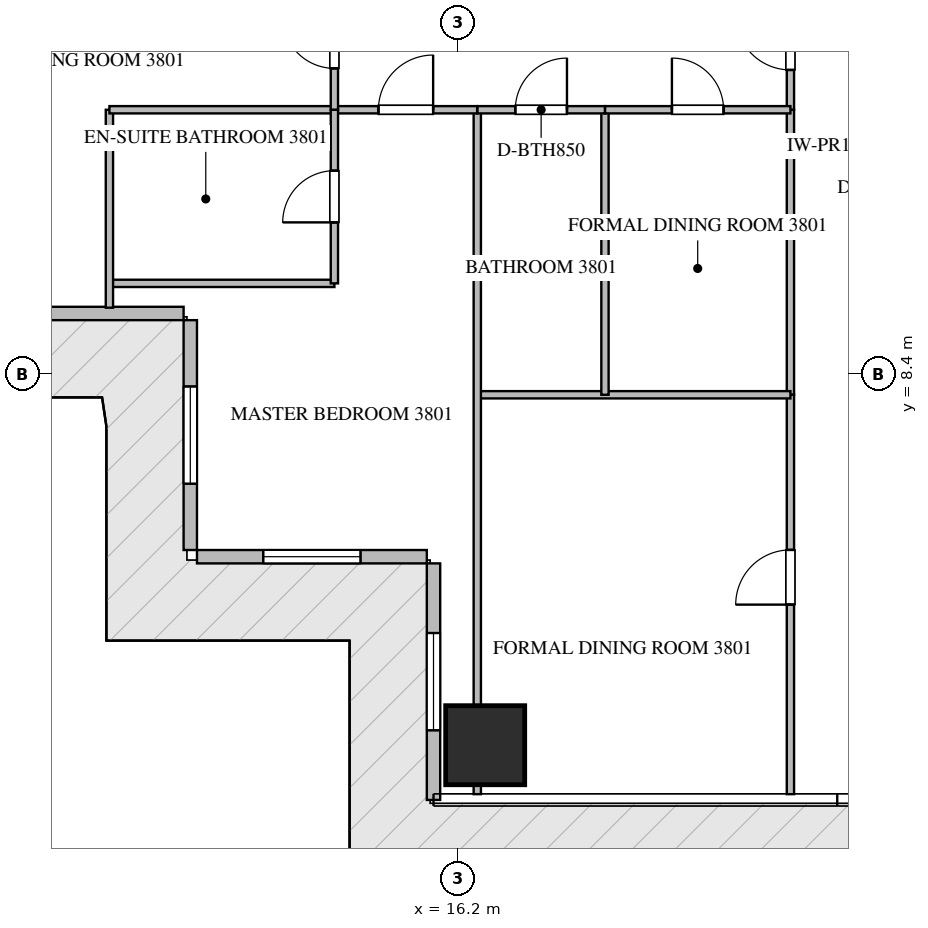
"""IFC4 building model, lengths in metres.
Left out: names, types, materials, properties, quantities, classifications, styles, units other than length and angle.
Written with IfcOpenShell. Run it as: python <this file> out.ifc"""

import sys

from ifc_helpers import new_model, si_unit, direction, frame, frame_2d, origin, origin_2d, place, context, subcontext, project, spatial, rectangle, extrude, source, transform, mapped, element, fill, save


model = new_model("IFC4")
c1 = context("Model", 3, precision=1e-05, world=origin(), true_north=direction((0.0, 1.0)))
c2 = subcontext(c1, "Body", "Model", "MODEL_VIEW")
j1 = project(units=[si_unit("LENGTHUNIT", "METRE"), si_unit("PLANEANGLEUNIT", "RADIAN")], contexts=[c1])
p1 = place(None, origin())
s1 = spatial("IfcSite", under=j1, at=p1, CompositionType="ELEMENT")
p2 = place(p1, origin())
s2 = spatial("IfcBuilding", under=s1, at=p2, CompositionType="ELEMENT")
p3 = place(p2, frame((0.0, 0.0, 153.9)))
s3 = spatial("IfcBuildingStorey", under=s2, at=p3, CompositionType="ELEMENT", Elevation=153.9)
m1 = source(origin(), c2, "Body", "SweptSolid", [
    extrude(rectangle(XDim=1.3, YDim=1.3, at=origin_2d()), origin(), (0.0, 0.0, 1.0), 3.75),
])
p4 = place(p3, frame((16.65, 2.3, -0.26), z_axis=(0.0, 0.0, 1.0), x_axis=(1.0, 0.0, 0.0)))
e1 = element("IfcColumn", 1, at=p4, inside=s3, PredefinedType="COLUMN", context=c2, shape_type="MappedRepresentation", body=[
    mapped(m1, transform((0.0, 0.0, 0.0), scale=1.0)),
])
p5 = place(p3, frame((7.8, 9.4, 0.0), z_axis=(0.0, 0.0, 1.0), x_axis=(1.0, 0.0, 0.0)))
e2 = element("IfcWall", 2, at=p5, inside=s3, PredefinedType="ELEMENTEDWALL", context=c2, shape_type="SweptSolid", body=[
    extrude(rectangle(XDim=3.89, YDim=0.22, at=frame_2d((1.945, 0.0))), origin(), (0.0, 0.0, 1.0), 3.475),
])
p6 = place(p3, frame((11.8, 9.29, 0.0), z_axis=(0.0, 0.0, 1.0), x_axis=(0.0, -1.0, 0.0)))
e3 = element("IfcWall", 3, at=p6, inside=s3, PredefinedType="ELEMENTEDWALL", context=c2, shape_type="SweptSolid", body=[
    extrude(rectangle(XDim=3.78, YDim=0.22, at=frame_2d((1.89, 0.0))), origin(), (0.0, 0.0, 1.0), 3.475),
])
p7 = place(p6, frame((1.09, 0.0, 0.65)))
e4 = element("IfcOpeningElement", 4, at=p7, cuts=e3, PredefinedType="OPENING", context=c2, shape_type="SweptSolid", body=[
    extrude(rectangle(XDim=1.6, YDim=2.1, at=frame_2d((0.8, 1.05))), frame((0.0, 0.12, 0.0), z_axis=(0.0, -1.0, 0.0), x_axis=(1.0, 0.0, 0.0)), (0.0, 0.0, 1.0), 0.24),
])
p8 = place(p3, frame((11.91, 5.4, 0.0), z_axis=(0.0, 0.0, 1.0), x_axis=(1.0, 0.0, 0.0)))
e5 = element("IfcWall", 5, at=p8, inside=s3, PredefinedType="ELEMENTEDWALL", context=c2, shape_type="SweptSolid", body=[
    extrude(rectangle(XDim=3.78, YDim=0.22, at=frame_2d((1.89, 0.0))), origin(), (0.0, 0.0, 1.0), 3.475),
])
p9 = place(p8, frame((1.09, 0.0, 0.65)))
e6 = element("IfcOpeningElement", 6, at=p9, cuts=e5, PredefinedType="OPENING", context=c2, shape_type="SweptSolid", body=[
    extrude(rectangle(XDim=1.6, YDim=2.1, at=frame_2d((0.8, 1.05))), frame((0.0, 0.12, 0.0), z_axis=(0.0, -1.0, 0.0), x_axis=(1.0, 0.0, 0.0)), (0.0, 0.0, 1.0), 0.24),
])
p10 = place(p3, frame((15.8, 5.29, 0.0), z_axis=(0.0, 0.0, 1.0), x_axis=(0.0, -1.0, 0.0)))
e7 = element("IfcWall", 7, at=p10, inside=s3, PredefinedType="ELEMENTEDWALL", context=c2, shape_type="SweptSolid", body=[
    extrude(rectangle(XDim=3.89, YDim=0.22, at=frame_2d((1.945, 0.0))), origin(), (0.0, 0.0, 1.0), 3.475),
])
p11 = place(p10, frame((1.145, 0.0, 0.65)))
e8 = element("IfcOpeningElement", 8, at=p11, cuts=e7, PredefinedType="OPENING", context=c2, shape_type="SweptSolid", body=[
    extrude(rectangle(XDim=1.6, YDim=2.1, at=frame_2d((0.8, 1.05))), frame((0.0, 0.12, 0.0), z_axis=(0.0, -1.0, 0.0), x_axis=(1.0, 0.0, 0.0)), (0.0, 0.0, 1.0), 0.24),
])
p12 = place(p3, frame((21.67, 12.15, 0.0), z_axis=(0.0, 0.0, 1.0), x_axis=(1.0, 0.0, 0.0)))
e9 = element("IfcWall", 9, at=p12, inside=s3, PredefinedType="PARTITIONING", context=c2, shape_type="SweptSolid", body=[
    extrude(rectangle(XDim=2.85, YDim=0.12, at=frame_2d((1.425, 0.0))), origin(), (0.0, 0.0, 1.0), 3.49),
])
p13 = place(p12, frame((1.0, 0.0, 0.0)))
e10 = element("IfcOpeningElement", 10, at=p13, cuts=e9, PredefinedType="OPENING", context=c2, shape_type="SweptSolid", body=[
    extrude(rectangle(XDim=0.85, YDim=2.1, at=frame_2d((0.425, 1.05))), frame((0.0, 0.07, 0.0), z_axis=(0.0, -1.0, 0.0), x_axis=(1.0, 0.0, 0.0)), (0.0, 0.0, 1.0), 0.14),
])
p14 = place(p3, frame((21.67, 12.75, 0.0), z_axis=(0.0, 0.0, 1.0), x_axis=(0.0, 1.0, 0.0)))
e11 = element("IfcWall", 11, at=p14, inside=s3, PredefinedType="PARTITIONING", context=c2, shape_type="SweptSolid", body=[
    extrude(rectangle(XDim=2.21, YDim=0.12, at=frame_2d((1.105, 0.0))), origin(), (0.0, 0.0, 1.0), 3.49),
])
p15 = place(p14, frame((0.655, 0.0, 0.0)))
e12 = element("IfcOpeningElement", 12, at=p15, cuts=e11, PredefinedType="OPENING", context=c2, shape_type="SweptSolid", body=[
    extrude(rectangle(XDim=0.9, YDim=2.1, at=frame_2d((0.45, 1.05))), frame((0.0, 0.07, 0.0), z_axis=(0.0, -1.0, 0.0), x_axis=(1.0, 0.0, 0.0)), (0.0, 0.0, 1.0), 0.14),
])
p16 = place(p3, frame((21.67, 1.495, 0.0), z_axis=(0.0, 0.0, 1.0), x_axis=(0.0, 1.0, 0.0)))
e13 = element("IfcWall", 13, at=p16, inside=s3, PredefinedType="PARTITIONING", context=c2, shape_type="SweptSolid", body=[
    extrude(rectangle(XDim=6.568, YDim=0.12, at=frame_2d((3.284, 0.0))), origin(), (0.0, 0.0, 1.0), 3.49),
])
p17 = place(p16, frame((3.117, 0.0, 0.0)))
e14 = element("IfcOpeningElement", 14, at=p17, cuts=e13, PredefinedType="OPENING", context=c2, shape_type="SweptSolid", body=[
    extrude(rectangle(XDim=0.9, YDim=2.1, at=frame_2d((0.45, 1.05))), frame((0.0, 0.07, 0.0), z_axis=(0.0, -1.0, 0.0), x_axis=(1.0, 0.0, 0.0)), (0.0, 0.0, 1.0), 0.14),
])
p18 = place(p3, frame((21.67, 8.065, 0.0), z_axis=(0.0, 0.0, 1.0), x_axis=(0.0, 1.0, 0.0)))
e15 = element("IfcWall", 15, at=p18, inside=s3, PredefinedType="PARTITIONING", context=c2, shape_type="SweptSolid", body=[
    extrude(rectangle(XDim=4.683, YDim=0.12, at=frame_2d((2.342, 0.0))), origin(), (0.0, 0.0, 1.0), 3.49),
])
p19 = place(p3, frame((16.52, 8.063, 0.0), z_axis=(0.0, 0.0, 1.0), x_axis=(1.0, 0.0, 0.0)))
e16 = element("IfcWall", 16, at=p19, inside=s3, PredefinedType="PARTITIONING", context=c2, shape_type="SweptSolid", body=[
    extrude(rectangle(XDim=5.15, YDim=0.12, at=frame_2d((2.575, 0.0))), origin(), (0.0, 0.0, 1.0), 3.49),
])
p20 = place(p3, frame((16.52, 1.495, 0.0), z_axis=(0.0, 0.0, 1.0), x_axis=(0.0, 1.0, 0.0)))
e17 = element("IfcWall", 17, at=p20, inside=s3, PredefinedType="PARTITIONING", context=c2, shape_type="SweptSolid", body=[
    extrude(rectangle(XDim=11.255, YDim=0.12, at=frame_2d((5.627, 0.0))), origin(), (0.0, 0.0, 1.0), 2.972),
])
p21 = place(p3, frame((18.62, 8.063, 0.0), z_axis=(0.0, 0.0, 1.0), x_axis=(0.0, 1.0, 0.0)))
e18 = element("IfcWall", 18, at=p21, inside=s3, PredefinedType="PARTITIONING", context=c2, shape_type="SweptSolid", body=[
    extrude(rectangle(XDim=4.687, YDim=0.12, at=frame_2d((2.344, 0.0))), origin(), (0.0, 0.0, 1.0), 3.49),
])
p22 = place(p3, frame((16.52, 12.75, 0.0), z_axis=(0.0, 0.0, 1.0), x_axis=(1.0, 0.0, 0.0)))
e19 = element("IfcWall", 19, at=p22, inside=s3, PredefinedType="PARTITIONING", context=c2, shape_type="SweptSolid", body=[
    extrude(rectangle(XDim=2.1, YDim=0.12, at=frame_2d((1.05, 0.0))), origin(), (0.0, 0.0, 1.0), 3.49),
])
p23 = place(p22, frame((0.625, 0.0, 0.0)))
e20 = element("IfcOpeningElement", 20, at=p23, cuts=e19, PredefinedType="OPENING", context=c2, shape_type="SweptSolid", body=[
    extrude(rectangle(XDim=0.85, YDim=2.1, at=frame_2d((0.425, 1.05))), frame((0.0, 0.07, 0.0), z_axis=(0.0, -1.0, 0.0), x_axis=(1.0, 0.0, 0.0)), (0.0, 0.0, 1.0), 0.14),
])
p24 = place(p3, frame((18.622, 12.75, 0.0), z_axis=(0.0, 0.0, 1.0), x_axis=(1.0, 0.0, 0.0)))
e21 = element("IfcWall", 21, at=p24, inside=s3, PredefinedType="PARTITIONING", context=c2, shape_type="SweptSolid", body=[
    extrude(rectangle(XDim=3.048, YDim=0.12, at=frame_2d((1.524, 0.0))), origin(), (0.0, 0.0, 1.0), 3.49),
])
p25 = place(p24, frame((1.099, 0.0, 0.0)))
e22 = element("IfcOpeningElement", 22, at=p25, cuts=e21, PredefinedType="OPENING", context=c2, shape_type="SweptSolid", body=[
    extrude(rectangle(XDim=0.85, YDim=2.1, at=frame_2d((0.425, 1.05))), frame((0.0, 0.07, 0.0), z_axis=(0.0, -1.0, 0.0), x_axis=(1.0, 0.0, 0.0)), (0.0, 0.0, 1.0), 0.14),
])
p26 = place(p3, frame((14.17, 12.75, 0.0), z_axis=(0.0, 0.0, 1.0), x_axis=(1.0, 0.0, 0.0)))
e23 = element("IfcWall", 23, at=p26, inside=s3, PredefinedType="PARTITIONING", context=c2, shape_type="SweptSolid", body=[
    extrude(rectangle(XDim=2.348, YDim=0.12, at=frame_2d((1.174, 0.0))), origin(), (0.0, 0.0, 1.0), 3.49),
])
p27 = place(p26, frame((0.724, 0.0, 0.0)))
e24 = element("IfcOpeningElement", 24, at=p27, cuts=e23, PredefinedType="OPENING", context=c2, shape_type="SweptSolid", body=[
    extrude(rectangle(XDim=0.9, YDim=2.1, at=frame_2d((0.45, 1.05))), frame((0.0, 0.07, 0.0), z_axis=(0.0, -1.0, 0.0), x_axis=(1.0, 0.0, 0.0)), (0.0, 0.0, 1.0), 0.14),
])
p28 = place(p3, frame((10.47, 9.895, 0.0), z_axis=(0.0, 0.0, 1.0), x_axis=(1.0, 0.0, 0.0)))
e25 = element("IfcWall", 25, at=p28, inside=s3, PredefinedType="PARTITIONING", context=c2, shape_type="SweptSolid", body=[
    extrude(rectangle(XDim=3.7, YDim=0.12, at=frame_2d((1.85, 0.0))), origin(), (0.0, 0.0, 1.0), 3.49),
])
p29 = place(p3, frame((10.47, 9.495, 0.0), z_axis=(0.0, 0.0, 1.0), x_axis=(0.0, 1.0, 0.0)))
e26 = element("IfcWall", 26, at=p29, inside=s3, PredefinedType="PARTITIONING", context=c2, shape_type="SweptSolid", body=[
    extrude(rectangle(XDim=3.255, YDim=0.12, at=frame_2d((1.627, 0.0))), origin(), (0.0, 0.0, 1.0), 3.49),
])
p30 = place(p3, frame((10.47, 12.75, 0.0), z_axis=(0.0, 0.0, 1.0), x_axis=(1.0, 0.0, 0.0)))
e27 = element("IfcWall", 27, at=p30, inside=s3, PredefinedType="PARTITIONING", context=c2, shape_type="SweptSolid", body=[
    extrude(rectangle(XDim=3.698, YDim=0.12, at=frame_2d((1.849, 0.0))), origin(), (0.0, 0.0, 1.0), 3.49),
])
p31 = place(p3, frame((14.17, 9.895, 0.0), z_axis=(0.0, 0.0, 1.0), x_axis=(0.0, 1.0, 0.0)))
e28 = element("IfcWall", 28, at=p31, inside=s3, PredefinedType="PARTITIONING", context=c2, shape_type="SweptSolid", body=[
    extrude(rectangle(XDim=2.855, YDim=0.12, at=frame_2d((1.427, 0.0))), origin(), (0.0, 0.0, 1.0), 3.49),
])
p32 = place(p31, frame((1.003, 0.0, 0.0)))
e29 = element("IfcOpeningElement", 29, at=p32, cuts=e28, PredefinedType="OPENING", context=c2, shape_type="SweptSolid", body=[
    extrude(rectangle(XDim=0.85, YDim=2.1, at=frame_2d((0.425, 1.05))), frame((0.0, 0.07, 0.0), z_axis=(0.0, -1.0, 0.0), x_axis=(1.0, 0.0, 0.0)), (0.0, 0.0, 1.0), 0.14),
])
p33 = place(p3, frame((14.17, 12.752, 0.0), z_axis=(0.0, 0.0, 1.0), x_axis=(0.0, 1.0, 0.0)))
e30 = element("IfcWall", 30, at=p33, inside=s3, PredefinedType="PARTITIONING", context=c2, shape_type="SweptSolid", body=[
    extrude(rectangle(XDim=2.208, YDim=0.12, at=frame_2d((1.104, 0.0))), origin(), (0.0, 0.0, 1.0), 3.49),
])
p34 = place(p33, frame((0.679, 0.0, 0.0)))
e31 = element("IfcOpeningElement", 31, at=p34, cuts=e30, PredefinedType="OPENING", context=c2, shape_type="SweptSolid", body=[
    extrude(rectangle(XDim=0.85, YDim=2.1, at=frame_2d((0.425, 1.05))), frame((0.0, 0.07, 0.0), z_axis=(0.0, -1.0, 0.0), x_axis=(1.0, 0.0, 0.0)), (0.0, 0.0, 1.0), 0.14),
])
m2 = source(origin(), c2, "Body", "SweptSolid", [
    extrude(rectangle(XDim=1.6, YDim=2.1, at=frame_2d((0.8, 1.05))), frame((0.0, 0.03, 0.0), z_axis=(0.0, -1.0, 0.0), x_axis=(1.0, 0.0, 0.0)), (0.0, 0.0, 1.0), 0.06),
])
p35 = place(p7, origin())
e32 = element("IfcWindow", 32, at=p35, inside=s3, PartitioningType="SINGLE_PANEL", PredefinedType="WINDOW", context=c2, shape_type="MappedRepresentation", body=[
    mapped(m2, transform((0.0, 0.0, 0.0), scale=1.0)),
])
fill(e4, e32)
p36 = place(p9, origin())
e33 = element("IfcWindow", 33, at=p36, inside=s3, PartitioningType="SINGLE_PANEL", PredefinedType="WINDOW", context=c2, shape_type="MappedRepresentation", body=[
    mapped(m2, transform((0.0, 0.0, 0.0), scale=1.0)),
])
fill(e6, e33)
p37 = place(p11, origin())
e34 = element("IfcWindow", 34, at=p37, inside=s3, PartitioningType="SINGLE_PANEL", PredefinedType="WINDOW", context=c2, shape_type="MappedRepresentation", body=[
    mapped(m2, transform((0.0, 0.0, 0.0), scale=1.0)),
])
fill(e8, e34)
m3 = source(origin(), c2, "Body", "SweptSolid", [
    extrude(rectangle(XDim=0.9, YDim=2.1, at=frame_2d((0.45, 1.05))), frame((0.0, 0.025, 0.0), z_axis=(0.0, -1.0, 0.0), x_axis=(1.0, 0.0, 0.0)), (0.0, 0.0, 1.0), 0.05),
])
p38 = place(p15, origin())
e35 = element("IfcDoor", 35, at=p38, inside=s3, OperationType="SINGLE_SWING_RIGHT", PredefinedType="DOOR", context=c2, shape_type="MappedRepresentation", body=[
    mapped(m3, transform((0.0, 0.0, 0.0), scale=1.0)),
])
fill(e12, e35)
p39 = place(p17, origin())
e36 = element("IfcDoor", 36, at=p39, inside=s3, OperationType="SINGLE_SWING_LEFT", PredefinedType="DOOR", context=c2, shape_type="MappedRepresentation", body=[
    mapped(m3, transform((0.0, 0.0, 0.0), scale=1.0)),
])
fill(e14, e36)
m4 = source(origin(), c2, "Body", "SweptSolid", [
    extrude(rectangle(XDim=0.85, YDim=2.1, at=frame_2d((0.425, 1.05))), frame((0.0, 0.025, 0.0), z_axis=(0.0, -1.0, 0.0), x_axis=(1.0, 0.0, 0.0)), (0.0, 0.0, 1.0), 0.05),
])
p40 = place(p23, origin())
e37 = element("IfcDoor", 37, at=p40, inside=s3, OperationType="SINGLE_SWING_RIGHT", PredefinedType="DOOR", context=c2, shape_type="MappedRepresentation", body=[
    mapped(m4, transform((0.0, 0.0, 0.0), scale=1.0)),
])
fill(e20, e37)
p41 = place(p25, origin())
e38 = element("IfcDoor", 38, at=p41, inside=s3, OperationType="SINGLE_SWING_LEFT", PredefinedType="DOOR", context=c2, shape_type="MappedRepresentation", body=[
    mapped(m4, transform((0.0, 0.0, 0.0), scale=1.0)),
])
fill(e22, e38)
p42 = place(p27, origin())
e39 = element("IfcDoor", 39, at=p42, inside=s3, OperationType="SINGLE_SWING_RIGHT", PredefinedType="DOOR", context=c2, shape_type="MappedRepresentation", body=[
    mapped(m3, transform((0.0, 0.0, 0.0), scale=1.0)),
])
fill(e24, e39)
p43 = place(p32, origin())
e40 = element("IfcDoor", 40, at=p43, inside=s3, OperationType="SINGLE_SWING_LEFT", PredefinedType="DOOR", context=c2, shape_type="MappedRepresentation", body=[
    mapped(m4, transform((0.0, 0.0, 0.0), scale=1.0)),
])
fill(e29, e40)
p44 = place(p34, origin())
e41 = element("IfcDoor", 41, at=p44, inside=s3, OperationType="SINGLE_SWING_RIGHT", PredefinedType="DOOR", context=c2, shape_type="MappedRepresentation", body=[
    mapped(m4, transform((0.0, 0.0, 0.0), scale=1.0)),
])
fill(e31, e41)
save(model, sys.argv[1])
